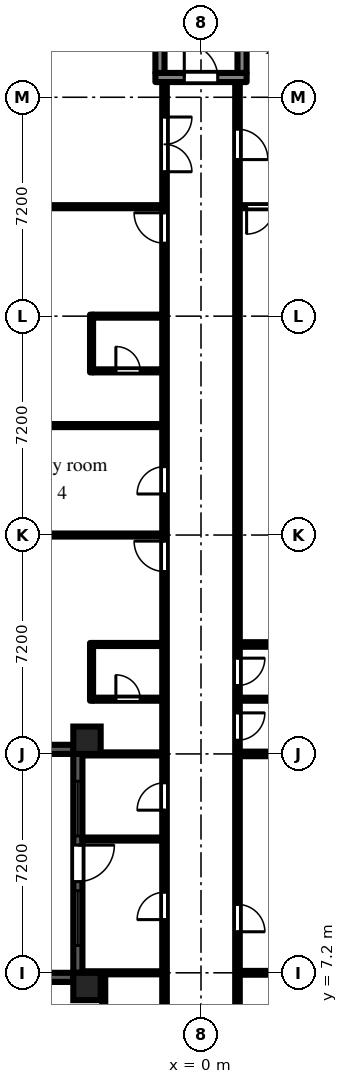
"""IFC4 building model, lengths in metres.
Left out: names, types, materials, properties, quantities, classifications, styles, units other than length and angle.
Written with IfcOpenShell. Run it as: python <this file> out.ifc"""

import sys

from ifc_helpers import new_model, si_unit, direction, frame, frame_2d, origin, origin_2d, place, context, subcontext, project, spatial, rectangle, extrude, element, fill, save


model = new_model("IFC4")
c1 = context("Model", 3, precision=1e-05, world=origin(), true_north=direction((0.0, 1.0)))
c2 = subcontext(c1, "Body", "Model", "MODEL_VIEW")
j1 = project(units=[si_unit("LENGTHUNIT", "METRE"), si_unit("PLANEANGLEUNIT", "RADIAN")], contexts=[c1])
p1 = place(None, origin())
s1 = spatial("IfcSite", under=j1, at=p1, CompositionType="ELEMENT")
p2 = place(p1, origin())
s2 = spatial("IfcBuilding", under=s1, at=p2, CompositionType="ELEMENT")
p3 = place(p2, frame((0.0, 0.0, 53.7)))
s3 = spatial("IfcBuildingStorey", under=s2, at=p3, CompositionType="ELEMENT", Elevation=53.7)
for number, where, z_axis, x_axis in (
    (1, (-3.75, 6.75, 0.0), (0.0, 0.0, 1.0), (1.0, 0.0, 0.0)),
    (2, (-3.75, 14.85, 0.0), (0.0, 0.0, 1.0), (1.0, 0.0, 0.0)),
):
    element("IfcColumn", number, at=place(p3, frame(where, z_axis=z_axis, x_axis=x_axis)), inside=s3, PredefinedType="COLUMN", context=c2, shape_type="SweptSolid", body=[
        extrude(rectangle(XDim=0.9, YDim=0.9, at=origin_2d()), origin(), (0.0, 0.0, 1.0), 3.0),
    ])
p4 = place(p3, frame((-6.3, 14.55, 0.0), z_axis=(0.0, 0.0, 1.0), x_axis=(1.0, 0.0, 0.0)))
e3 = element("IfcWall", 3, at=p4, inside=s3, PredefinedType="SOLIDWALL", context=c2, shape_type="SweptSolid", body=[
    extrude(rectangle(XDim=2.1, YDim=0.3, at=frame_2d((1.05, 0.0))), origin(), (0.0, 0.0, 1.0), 2.1),
])
p5 = place(p3, frame((-4.05, 14.4, 0.0), z_axis=(0.0, 0.0, 1.0), x_axis=(0.0, -1.0, 0.0)))
e4 = element("IfcWall", 4, at=p5, inside=s3, PredefinedType="SOLIDWALL", context=c2, shape_type="SweptSolid", body=[
    extrude(rectangle(XDim=7.2, YDim=0.3, at=frame_2d((3.6, 0.0))), origin(), (0.0, 0.0, 1.0), 2.1),
])
p6 = place(p5, frame((3.0, 0.0, 0.0)))
e5 = element("IfcOpeningElement", 5, at=p6, cuts=e4, PredefinedType="OPENING", context=c2, shape_type="SweptSolid", body=[
    extrude(rectangle(XDim=1.2, YDim=2.05, at=frame_2d((0.6, 1.025))), frame((0.0, 0.16, 0.0), z_axis=(0.0, -1.0, 0.0), x_axis=(1.0, 0.0, 0.0)), (0.0, 0.0, 1.0), 0.32),
])
p7 = place(p5, frame((0.9, 0.0, 0.2)))
e6 = element("IfcOpeningElement", 6, at=p7, cuts=e4, PredefinedType="OPENING", context=c2, shape_type="SweptSolid", body=[
    extrude(rectangle(XDim=1.8, YDim=1.85, at=frame_2d((0.9, 0.925))), frame((0.0, 0.16, 0.0), z_axis=(0.0, -1.0, 0.0), x_axis=(1.0, 0.0, 0.0)), (0.0, 0.0, 1.0), 0.32),
])
p8 = place(p5, frame((4.5, 0.0, 0.2)))
e7 = element("IfcOpeningElement", 7, at=p8, cuts=e4, PredefinedType="OPENING", context=c2, shape_type="SweptSolid", body=[
    extrude(rectangle(XDim=1.8, YDim=1.85, at=frame_2d((0.9, 0.925))), frame((0.0, 0.16, 0.0), z_axis=(0.0, -1.0, 0.0), x_axis=(1.0, 0.0, 0.0)), (0.0, 0.0, 1.0), 0.32),
])
p9 = place(p3, frame((-4.2, 7.05, 0.0), z_axis=(0.0, 0.0, 1.0), x_axis=(-1.0, 0.0, 0.0)))
e8 = element("IfcWall", 8, at=p9, inside=s3, PredefinedType="SOLIDWALL", context=c2, shape_type="SweptSolid", body=[
    extrude(rectangle(XDim=3.0, YDim=0.3, at=frame_2d((1.5, 0.0))), origin(), (0.0, 0.0, 1.0), 2.1),
])
p10 = place(p3, frame((-1.5, 36.65, 0.0), z_axis=(0.0, 0.0, 1.0), x_axis=(1.0, 0.0, 0.0)))
e9 = element("IfcWall", 9, at=p10, inside=s3, PredefinedType="SHEAR", context=c2, shape_type="SweptSolid", body=[
    extrude(rectangle(XDim=3.0, YDim=0.3, at=frame_2d((1.5, 0.0))), origin(), (0.0, 0.0, 1.0), 2.575),
])
p11 = place(p10, frame((0.95, 0.0, 0.0)))
e10 = element("IfcOpeningElement", 10, at=p11, cuts=e9, PredefinedType="OPENING", context=c2, shape_type="SweptSolid", body=[
    extrude(rectangle(XDim=1.1, YDim=2.1, at=frame_2d((0.55, 1.05))), frame((0.0, 0.16, 0.0), z_axis=(0.0, -1.0, 0.0), x_axis=(1.0, 0.0, 0.0)), (0.0, 0.0, 1.0), 0.32),
])
for number, where, z_axis, x_axis in (
    (11, (-1.35, 36.8, 0.0), (0.0, 0.0, 1.0), (0.0, 1.0, 0.0)),
    (12, (1.35, 36.8, 0.0), (0.0, 0.0, 1.0), (0.0, 1.0, 0.0)),
):
    element("IfcWall", number, at=place(p3, frame(where, z_axis=z_axis, x_axis=x_axis)), inside=s3, PredefinedType="SHEAR", context=c2, shape_type="SweptSolid", body=[
        extrude(rectangle(XDim=5.8, YDim=0.3, at=frame_2d((2.9, 0.0))), origin(), (0.0, 0.0, 1.0), 2.575),
    ])
for number, where, z_axis, x_axis in (
    (13, (-6.9, 21.6, 0.0), (0.0, 0.0, 1.0), (1.0, 0.0, 0.0)),
    (14, (-6.9, 25.2, 0.0), (0.0, 0.0, 1.0), (1.0, 0.0, 0.0)),
    (15, (-6.9, 32.4, 0.0), (0.0, 0.0, 1.0), (1.0, 0.0, 0.0)),
):
    element("IfcWall", number, at=place(p3, frame(where, z_axis=z_axis, x_axis=x_axis)), inside=s3, PredefinedType="PARTITIONING", context=c2, shape_type="SweptSolid", body=[
        extrude(rectangle(XDim=5.625, YDim=0.1, at=frame_2d((2.812, 0.0))), origin(), (0.0, 0.0, 1.0), 2.575),
    ])
for number, where, z_axis, x_axis in (
    (16, (-3.9, 7.2, 0.0), (0.0, 0.0, 1.0), (1.0, 0.0, 0.0)),
    (17, (-3.9, 11.6, 0.0), (0.0, 0.0, 1.0), (1.0, 0.0, 0.0)),
    (18, (-3.9, 14.4, 0.0), (0.0, 0.0, 1.0), (1.0, 0.0, 0.0)),
):
    element("IfcWall", number, at=place(p3, frame(where, z_axis=z_axis, x_axis=x_axis)), inside=s3, PredefinedType="PARTITIONING", context=c2, shape_type="SweptSolid", body=[
        extrude(rectangle(XDim=2.625, YDim=0.1, at=frame_2d((1.312, 0.0))), origin(), (0.0, 0.0, 1.0), 2.575),
    ])
p12 = place(p3, frame((-3.6, 16.15, 0.0), z_axis=(0.0, 0.0, 1.0), x_axis=(0.0, 1.0, 0.0)))
e19 = element("IfcWall", 19, at=p12, inside=s3, PredefinedType="PARTITIONING", context=c2, shape_type="SweptSolid", body=[
    extrude(rectangle(XDim=1.9, YDim=0.1, at=frame_2d((0.95, 0.0))), origin(), (0.0, 0.0, 1.0), 2.575),
])
p13 = place(p3, frame((-3.55, 16.2, 0.0), z_axis=(0.0, 0.0, 1.0), x_axis=(1.0, 0.0, 0.0)))
e20 = element("IfcWall", 20, at=p13, inside=s3, PredefinedType="PARTITIONING", context=c2, shape_type="SweptSolid", body=[
    extrude(rectangle(XDim=2.275, YDim=0.1, at=frame_2d((1.138, 0.0))), origin(), (0.0, 0.0, 1.0), 2.575),
])
p14 = place(p13, frame((0.75, 0.0, 0.0)))
e21 = element("IfcOpeningElement", 21, at=p14, cuts=e20, PredefinedType="OPENING", context=c2, shape_type="SweptSolid", body=[
    extrude(rectangle(XDim=0.8, YDim=2.1, at=frame_2d((0.4, 1.05))), frame((0.0, 0.06, 0.0), z_axis=(0.0, -1.0, 0.0), x_axis=(1.0, 0.0, 0.0)), (0.0, 0.0, 1.0), 0.12),
])
p15 = place(p3, frame((-3.55, 18.0, 0.0), z_axis=(0.0, 0.0, 1.0), x_axis=(1.0, 0.0, 0.0)))
e22 = element("IfcWall", 22, at=p15, inside=s3, PredefinedType="PARTITIONING", context=c2, shape_type="SweptSolid", body=[
    extrude(rectangle(XDim=2.275, YDim=0.1, at=frame_2d((1.138, 0.0))), origin(), (0.0, 0.0, 1.0), 2.575),
])
p16 = place(p3, frame((-3.6, 26.95, 0.0), z_axis=(0.0, 0.0, 1.0), x_axis=(0.0, 1.0, 0.0)))
e23 = element("IfcWall", 23, at=p16, inside=s3, PredefinedType="PARTITIONING", context=c2, shape_type="SweptSolid", body=[
    extrude(rectangle(XDim=1.9, YDim=0.1, at=frame_2d((0.95, 0.0))), origin(), (0.0, 0.0, 1.0), 2.575),
])
p17 = place(p3, frame((-3.55, 27.0, 0.0), z_axis=(0.0, 0.0, 1.0), x_axis=(1.0, 0.0, 0.0)))
e24 = element("IfcWall", 24, at=p17, inside=s3, PredefinedType="PARTITIONING", context=c2, shape_type="SweptSolid", body=[
    extrude(rectangle(XDim=2.275, YDim=0.1, at=frame_2d((1.138, 0.0))), origin(), (0.0, 0.0, 1.0), 2.575),
])
p18 = place(p17, frame((0.75, 0.0, 0.0)))
e25 = element("IfcOpeningElement", 25, at=p18, cuts=e24, PredefinedType="OPENING", context=c2, shape_type="SweptSolid", body=[
    extrude(rectangle(XDim=0.8, YDim=2.1, at=frame_2d((0.4, 1.05))), frame((0.0, 0.06, 0.0), z_axis=(0.0, -1.0, 0.0), x_axis=(1.0, 0.0, 0.0)), (0.0, 0.0, 1.0), 0.12),
])
p19 = place(p3, frame((-3.55, 28.8, 0.0), z_axis=(0.0, 0.0, 1.0), x_axis=(1.0, 0.0, 0.0)))
e26 = element("IfcWall", 26, at=p19, inside=s3, PredefinedType="PARTITIONING", context=c2, shape_type="SweptSolid", body=[
    extrude(rectangle(XDim=2.275, YDim=0.1, at=frame_2d((1.138, 0.0))), origin(), (0.0, 0.0, 1.0), 2.575),
])
p20 = place(p3, frame((-3.2, 1.275, 0.0), z_axis=(0.0, 0.0, 1.0), x_axis=(0.0, 1.0, 0.0)))
e27 = element("IfcWall", 27, at=p20, inside=s3, PredefinedType="PARTITIONING", context=c2, shape_type="SweptSolid", body=[
    extrude(rectangle(XDim=5.875, YDim=0.1, at=frame_2d((2.938, 0.0))), origin(), (0.0, 0.0, 1.0), 2.575),
])
p21 = place(p3, frame((-1.2, 1.275, 0.0), z_axis=(0.0, 0.0, 1.0), x_axis=(0.0, 1.0, 0.0)))
e28 = element("IfcWall", 28, at=p21, inside=s3, PredefinedType="PARTITIONING", context=c2, shape_type="SweptSolid", body=[
    extrude(rectangle(XDim=35.225, YDim=0.15, at=frame_2d((17.613, 0.0))), origin(), (0.0, 0.0, 1.0), 2.575),
])
p22 = place(p21, frame((2.475, 0.0, 0.0)))
e29 = element("IfcOpeningElement", 29, at=p22, cuts=e28, PredefinedType="OPENING", context=c2, shape_type="SweptSolid", body=[
    extrude(rectangle(XDim=0.9, YDim=2.1, at=frame_2d((0.45, 1.05))), frame((0.0, 0.085, 0.0), z_axis=(0.0, -1.0, 0.0), x_axis=(1.0, 0.0, 0.0)), (0.0, 0.0, 1.0), 0.17),
])
p23 = place(p21, frame((11.275, 0.0, 0.0)))
e30 = element("IfcOpeningElement", 30, at=p23, cuts=e28, PredefinedType="OPENING", context=c2, shape_type="SweptSolid", body=[
    extrude(rectangle(XDim=0.9, YDim=2.1, at=frame_2d((0.45, 1.05))), frame((0.0, 0.085, 0.0), z_axis=(0.0, -1.0, 0.0), x_axis=(1.0, 0.0, 0.0)), (0.0, 0.0, 1.0), 0.17),
])
p24 = place(p21, frame((7.675, 0.0, 0.0)))
e31 = element("IfcOpeningElement", 31, at=p24, cuts=e28, PredefinedType="OPENING", context=c2, shape_type="SweptSolid", body=[
    extrude(rectangle(XDim=0.9, YDim=2.1, at=frame_2d((0.45, 1.05))), frame((0.0, 0.085, 0.0), z_axis=(0.0, -1.0, 0.0), x_axis=(1.0, 0.0, 0.0)), (0.0, 0.0, 1.0), 0.17),
])
p25 = place(p21, frame((19.125, 0.0, 0.0)))
e32 = element("IfcOpeningElement", 32, at=p25, cuts=e28, PredefinedType="OPENING", context=c2, shape_type="SweptSolid", body=[
    extrude(rectangle(XDim=1.0, YDim=2.1, at=frame_2d((0.5, 1.05))), frame((0.0, 0.085, 0.0), z_axis=(0.0, -1.0, 0.0), x_axis=(1.0, 0.0, 0.0)), (0.0, 0.0, 1.0), 0.17),
])
p26 = place(p21, frame((21.675, 0.0, 0.0)))
e33 = element("IfcOpeningElement", 33, at=p26, cuts=e28, PredefinedType="OPENING", context=c2, shape_type="SweptSolid", body=[
    extrude(rectangle(XDim=0.9, YDim=2.1, at=frame_2d((0.45, 1.05))), frame((0.0, 0.085, 0.0), z_axis=(0.0, -1.0, 0.0), x_axis=(1.0, 0.0, 0.0)), (0.0, 0.0, 1.0), 0.17),
])
p27 = place(p21, frame((29.925, 0.0, 0.0)))
e34 = element("IfcOpeningElement", 34, at=p27, cuts=e28, PredefinedType="OPENING", context=c2, shape_type="SweptSolid", body=[
    extrude(rectangle(XDim=1.0, YDim=2.1, at=frame_2d((0.5, 1.05))), frame((0.0, 0.085, 0.0), z_axis=(0.0, -1.0, 0.0), x_axis=(1.0, 0.0, 0.0)), (0.0, 0.0, 1.0), 0.17),
])
p28 = place(p21, frame((32.275, 0.0, 0.0)))
e35 = element("IfcOpeningElement", 35, at=p28, cuts=e28, PredefinedType="OPENING", context=c2, shape_type="SweptSolid", body=[
    extrude(rectangle(XDim=1.8, YDim=2.1, at=frame_2d((0.9, 1.05))), frame((0.0, 0.085, 0.0), z_axis=(0.0, -1.0, 0.0), x_axis=(1.0, 0.0, 0.0)), (0.0, 0.0, 1.0), 0.17),
])
p29 = place(p3, frame((1.2, 1.125, 0.0), z_axis=(0.0, 0.0, 1.0), x_axis=(0.0, 1.0, 0.0)))
e36 = element("IfcWall", 36, at=p29, inside=s3, PredefinedType="PARTITIONING", context=c2, shape_type="SweptSolid", body=[
    extrude(rectangle(XDim=35.375, YDim=0.15, at=frame_2d((17.688, 0.0))), origin(), (0.0, 0.0, 1.0), 2.575),
])
p30 = place(p29, frame((2.625, 0.0, 0.0)))
e37 = element("IfcOpeningElement", 37, at=p30, cuts=e36, PredefinedType="OPENING", context=c2, shape_type="SweptSolid", body=[
    extrude(rectangle(XDim=0.9, YDim=2.1, at=frame_2d((0.45, 1.05))), frame((0.0, 0.085, 0.0), z_axis=(0.0, -1.0, 0.0), x_axis=(1.0, 0.0, 0.0)), (0.0, 0.0, 1.0), 0.17),
])
p31 = place(p29, frame((7.425, 0.0, 0.0)))
e38 = element("IfcOpeningElement", 38, at=p31, cuts=e36, PredefinedType="OPENING", context=c2, shape_type="SweptSolid", body=[
    extrude(rectangle(XDim=0.9, YDim=2.1, at=frame_2d((0.45, 1.05))), frame((0.0, 0.085, 0.0), z_axis=(0.0, -1.0, 0.0), x_axis=(1.0, 0.0, 0.0)), (0.0, 0.0, 1.0), 0.17),
])
p32 = place(p29, frame((13.725, 0.0, 0.0)))
e39 = element("IfcOpeningElement", 39, at=p32, cuts=e36, PredefinedType="OPENING", context=c2, shape_type="SweptSolid", body=[
    extrude(rectangle(XDim=0.9, YDim=2.1, at=frame_2d((0.45, 1.05))), frame((0.0, 0.085, 0.0), z_axis=(0.0, -1.0, 0.0), x_axis=(1.0, 0.0, 0.0)), (0.0, 0.0, 1.0), 0.17),
])
p33 = place(p29, frame((15.525, 0.0, 0.0)))
e40 = element("IfcOpeningElement", 40, at=p33, cuts=e36, PredefinedType="OPENING", context=c2, shape_type="SweptSolid", body=[
    extrude(rectangle(XDim=0.9, YDim=2.1, at=frame_2d((0.45, 1.05))), frame((0.0, 0.085, 0.0), z_axis=(0.0, -1.0, 0.0), x_axis=(1.0, 0.0, 0.0)), (0.0, 0.0, 1.0), 0.17),
])
p34 = place(p29, frame((32.825, 0.0, 0.0)))
e41 = element("IfcOpeningElement", 41, at=p34, cuts=e36, PredefinedType="OPENING", context=c2, shape_type="SweptSolid", body=[
    extrude(rectangle(XDim=1.0, YDim=2.1, at=frame_2d((0.5, 1.05))), frame((0.0, 0.085, 0.0), z_axis=(0.0, -1.0, 0.0), x_axis=(1.0, 0.0, 0.0)), (0.0, 0.0, 1.0), 0.17),
])
p35 = place(p3, frame((1.275, 7.2, 0.0), z_axis=(0.0, 0.0, 1.0), x_axis=(1.0, 0.0, 0.0)))
e42 = element("IfcWall", 42, at=p35, inside=s3, PredefinedType="PARTITIONING", context=c2, shape_type="SweptSolid", body=[
    extrude(rectangle(XDim=2.625, YDim=0.125, at=frame_2d((1.312, 0.0))), origin(), (0.0, 0.0, 1.0), 2.575),
])
p36 = place(p3, frame((1.275, 14.4, 0.0), z_axis=(0.0, 0.0, 1.0), x_axis=(1.0, 0.0, 0.0)))
e43 = element("IfcWall", 43, at=p36, inside=s3, PredefinedType="PARTITIONING", context=c2, shape_type="SweptSolid", body=[
    extrude(rectangle(XDim=2.625, YDim=0.15, at=frame_2d((1.312, 0.0))), origin(), (0.0, 0.0, 1.0), 2.575),
])
p37 = place(p3, frame((1.275, 16.2, 0.0), z_axis=(0.0, 0.0, 1.0), x_axis=(1.0, 0.0, 0.0)))
e44 = element("IfcWall", 44, at=p37, inside=s3, PredefinedType="PARTITIONING", context=c2, shape_type="SweptSolid", body=[
    extrude(rectangle(XDim=5.625, YDim=0.1, at=frame_2d((2.812, 0.0))), origin(), (0.0, 0.0, 1.0), 2.575),
])
p38 = place(p3, frame((1.275, 18.0, 0.0), z_axis=(0.0, 0.0, 1.0), x_axis=(1.0, 0.0, 0.0)))
e45 = element("IfcWall", 45, at=p38, inside=s3, PredefinedType="PARTITIONING", context=c2, shape_type="SweptSolid", body=[
    extrude(rectangle(XDim=5.625, YDim=0.15, at=frame_2d((2.812, 0.0))), origin(), (0.0, 0.0, 1.0), 2.575),
])
p39 = place(p3, frame((1.275, 32.4, 0.0), z_axis=(0.0, 0.0, 1.0), x_axis=(1.0, 0.0, 0.0)))
e46 = element("IfcWall", 46, at=p39, inside=s3, PredefinedType="PARTITIONING", context=c2, shape_type="SweptSolid", body=[
    extrude(rectangle(XDim=5.625, YDim=0.1, at=frame_2d((2.812, 0.0))), origin(), (0.0, 0.0, 1.0), 2.575),
])
p40 = place(p39, frame((0.225, 0.0, 0.0)))
e47 = element("IfcOpeningElement", 47, at=p40, cuts=e46, PredefinedType="OPENING", context=c2, shape_type="SweptSolid", body=[
    extrude(rectangle(XDim=0.9, YDim=2.1, at=frame_2d((0.45, 1.05))), frame((0.0, 0.06, 0.0), z_axis=(0.0, -1.0, 0.0), x_axis=(1.0, 0.0, 0.0)), (0.0, 0.0, 1.0), 0.12),
])
p41 = place(p6, origin())
e48 = element("IfcDoor", 48, at=p41, inside=s3, OperationType="SINGLE_SWING_LEFT", PredefinedType="DOOR", context=c2, shape_type="SweptSolid", body=[
    extrude(rectangle(XDim=1.2, YDim=2.05, at=frame_2d((0.6, 1.025))), frame((0.0, 0.025, 0.0), z_axis=(0.0, -1.0, 0.0), x_axis=(1.0, 0.0, 0.0)), (0.0, 0.0, 1.0), 0.05),
])
fill(e5, e48)
p42 = place(p7, origin())
e49 = element("IfcWindow", 49, at=p42, inside=s3, PartitioningType="SINGLE_PANEL", PredefinedType="WINDOW", context=c2, shape_type="SweptSolid", body=[
    extrude(rectangle(XDim=1.8, YDim=1.85, at=frame_2d((0.9, 0.925))), frame((0.0, 0.03, 0.0), z_axis=(0.0, -1.0, 0.0), x_axis=(1.0, 0.0, 0.0)), (0.0, 0.0, 1.0), 0.06),
])
fill(e6, e49)
p43 = place(p8, origin())
e50 = element("IfcWindow", 50, at=p43, inside=s3, PartitioningType="SINGLE_PANEL", PredefinedType="WINDOW", context=c2, shape_type="SweptSolid", body=[
    extrude(rectangle(XDim=1.8, YDim=1.85, at=frame_2d((0.9, 0.925))), frame((0.0, 0.03, 0.0), z_axis=(0.0, -1.0, 0.0), x_axis=(1.0, 0.0, 0.0)), (0.0, 0.0, 1.0), 0.06),
])
fill(e7, e50)
p44 = place(p11, origin())
e51 = element("IfcDoor", 51, at=p44, inside=s3, OperationType="SINGLE_SWING_LEFT", PredefinedType="DOOR", context=c2, shape_type="SweptSolid", body=[
    extrude(rectangle(XDim=1.1, YDim=2.1, at=frame_2d((0.55, 1.05))), frame((0.0, 0.025, 0.0), z_axis=(0.0, -1.0, 0.0), x_axis=(1.0, 0.0, 0.0)), (0.0, 0.0, 1.0), 0.05),
])
fill(e10, e51)
p45 = place(p23, origin())
e52 = element("IfcDoor", 52, at=p45, inside=s3, OperationType="SINGLE_SWING_LEFT", PredefinedType="DOOR", context=c2, shape_type="SweptSolid", body=[
    extrude(rectangle(XDim=0.9, YDim=2.1, at=frame_2d((0.45, 1.05))), frame((0.0, 0.025, 0.0), z_axis=(0.0, -1.0, 0.0), x_axis=(1.0, 0.0, 0.0)), (0.0, 0.0, 1.0), 0.05),
])
fill(e30, e52)
p46 = place(p24, origin())
e53 = element("IfcDoor", 53, at=p46, inside=s3, OperationType="SINGLE_SWING_LEFT", PredefinedType="DOOR", context=c2, shape_type="SweptSolid", body=[
    extrude(rectangle(XDim=0.9, YDim=2.1, at=frame_2d((0.45, 1.05))), frame((0.0, 0.025, 0.0), z_axis=(0.0, -1.0, 0.0), x_axis=(1.0, 0.0, 0.0)), (0.0, 0.0, 1.0), 0.05),
])
fill(e31, e53)
p47 = place(p14, origin())
e54 = element("IfcDoor", 54, at=p47, inside=s3, OperationType="SINGLE_SWING_LEFT", PredefinedType="DOOR", context=c2, shape_type="SweptSolid", body=[
    extrude(rectangle(XDim=0.8, YDim=2.1, at=frame_2d((0.4, 1.05))), frame((0.0, 0.025, 0.0), z_axis=(0.0, -1.0, 0.0), x_axis=(1.0, 0.0, 0.0)), (0.0, 0.0, 1.0), 0.05),
])
fill(e21, e54)
p48 = place(p25, origin())
e55 = element("IfcDoor", 55, at=p48, inside=s3, OperationType="SINGLE_SWING_RIGHT", PredefinedType="DOOR", context=c2, shape_type="SweptSolid", body=[
    extrude(rectangle(XDim=1.0, YDim=2.1, at=frame_2d((0.5, 1.05))), frame((0.0, 0.025, 0.0), z_axis=(0.0, -1.0, 0.0), x_axis=(1.0, 0.0, 0.0)), (0.0, 0.0, 1.0), 0.05),
])
fill(e32, e55)
p49 = place(p26, origin())
e56 = element("IfcDoor", 56, at=p49, inside=s3, OperationType="SINGLE_SWING_LEFT", PredefinedType="DOOR", context=c2, shape_type="SweptSolid", body=[
    extrude(rectangle(XDim=0.9, YDim=2.1, at=frame_2d((0.45, 1.05))), frame((0.0, 0.025, 0.0), z_axis=(0.0, -1.0, 0.0), x_axis=(1.0, 0.0, 0.0)), (0.0, 0.0, 1.0), 0.05),
])
fill(e33, e56)
p50 = place(p18, origin())
e57 = element("IfcDoor", 57, at=p50, inside=s3, OperationType="SINGLE_SWING_LEFT", PredefinedType="DOOR", context=c2, shape_type="SweptSolid", body=[
    extrude(rectangle(XDim=0.8, YDim=2.1, at=frame_2d((0.4, 1.05))), frame((0.0, 0.025, 0.0), z_axis=(0.0, -1.0, 0.0), x_axis=(1.0, 0.0, 0.0)), (0.0, 0.0, 1.0), 0.05),
])
fill(e25, e57)
p51 = place(p27, origin())
e58 = element("IfcDoor", 58, at=p51, inside=s3, OperationType="SINGLE_SWING_RIGHT", PredefinedType="DOOR", context=c2, shape_type="SweptSolid", body=[
    extrude(rectangle(XDim=1.0, YDim=2.1, at=frame_2d((0.5, 1.05))), frame((0.0, 0.025, 0.0), z_axis=(0.0, -1.0, 0.0), x_axis=(1.0, 0.0, 0.0)), (0.0, 0.0, 1.0), 0.05),
])
fill(e34, e58)
p52 = place(p28, frame((1.8, 0.0, 0.0), z_axis=(0.0, 0.0, 1.0), x_axis=(-1.0, 0.0, 0.0)))
e59 = element("IfcDoor", 59, at=p52, inside=s3, OperationType="DOUBLE_DOOR_DOUBLE_SWING", PredefinedType="DOOR", context=c2, shape_type="SweptSolid", body=[
    extrude(rectangle(XDim=1.8, YDim=2.1, at=frame_2d((0.9, 1.05))), frame((0.0, 0.025, 0.0), z_axis=(0.0, -1.0, 0.0), x_axis=(1.0, 0.0, 0.0)), (0.0, 0.0, 1.0), 0.05),
])
fill(e35, e59)
p53 = place(p31, frame((0.9, 0.0, 0.0), z_axis=(0.0, 0.0, 1.0), x_axis=(-1.0, 0.0, 0.0)))
e60 = element("IfcDoor", 60, at=p53, inside=s3, OperationType="SINGLE_SWING_RIGHT", PredefinedType="DOOR", context=c2, shape_type="SweptSolid", body=[
    extrude(rectangle(XDim=0.9, YDim=2.1, at=frame_2d((0.45, 1.05))), frame((0.0, 0.025, 0.0), z_axis=(0.0, -1.0, 0.0), x_axis=(1.0, 0.0, 0.0)), (0.0, 0.0, 1.0), 0.05),
])
fill(e38, e60)
p54 = place(p32, frame((0.9, 0.0, 0.0), z_axis=(0.0, 0.0, 1.0), x_axis=(-1.0, 0.0, 0.0)))
e61 = element("IfcDoor", 61, at=p54, inside=s3, OperationType="SINGLE_SWING_LEFT", PredefinedType="DOOR", context=c2, shape_type="SweptSolid", body=[
    extrude(rectangle(XDim=0.9, YDim=2.1, at=frame_2d((0.45, 1.05))), frame((0.0, 0.025, 0.0), z_axis=(0.0, -1.0, 0.0), x_axis=(1.0, 0.0, 0.0)), (0.0, 0.0, 1.0), 0.05),
])
fill(e39, e61)
p55 = place(p33, frame((0.9, 0.0, 0.0), z_axis=(0.0, 0.0, 1.0), x_axis=(-1.0, 0.0, 0.0)))
e62 = element("IfcDoor", 62, at=p55, inside=s3, OperationType="SINGLE_SWING_LEFT", PredefinedType="DOOR", context=c2, shape_type="SweptSolid", body=[
    extrude(rectangle(XDim=0.9, YDim=2.1, at=frame_2d((0.45, 1.05))), frame((0.0, 0.025, 0.0), z_axis=(0.0, -1.0, 0.0), x_axis=(1.0, 0.0, 0.0)), (0.0, 0.0, 1.0), 0.05),
])
fill(e40, e62)
p56 = place(p34, frame((1.0, 0.0, 0.0), z_axis=(0.0, 0.0, 1.0), x_axis=(-1.0, 0.0, 0.0)))
e63 = element("IfcDoor", 63, at=p56, inside=s3, OperationType="SINGLE_SWING_RIGHT", PredefinedType="DOOR", context=c2, shape_type="SweptSolid", body=[
    extrude(rectangle(XDim=1.0, YDim=2.1, at=frame_2d((0.5, 1.05))), frame((0.0, 0.025, 0.0), z_axis=(0.0, -1.0, 0.0), x_axis=(1.0, 0.0, 0.0)), (0.0, 0.0, 1.0), 0.05),
])
fill(e41, e63)
p57 = place(p40, frame((0.9, 0.0, 0.0), z_axis=(0.0, 0.0, 1.0), x_axis=(-1.0, 0.0, 0.0)))
e64 = element("IfcDoor", 64, at=p57, inside=s3, OperationType="SINGLE_SWING_RIGHT", PredefinedType="DOOR", context=c2, shape_type="SweptSolid", body=[
    extrude(rectangle(XDim=0.9, YDim=2.1, at=frame_2d((0.45, 1.05))), frame((0.0, 0.025, 0.0), z_axis=(0.0, -1.0, 0.0), x_axis=(1.0, 0.0, 0.0)), (0.0, 0.0, 1.0), 0.05),
])
fill(e47, e64)
save(model, sys.argv[1])
